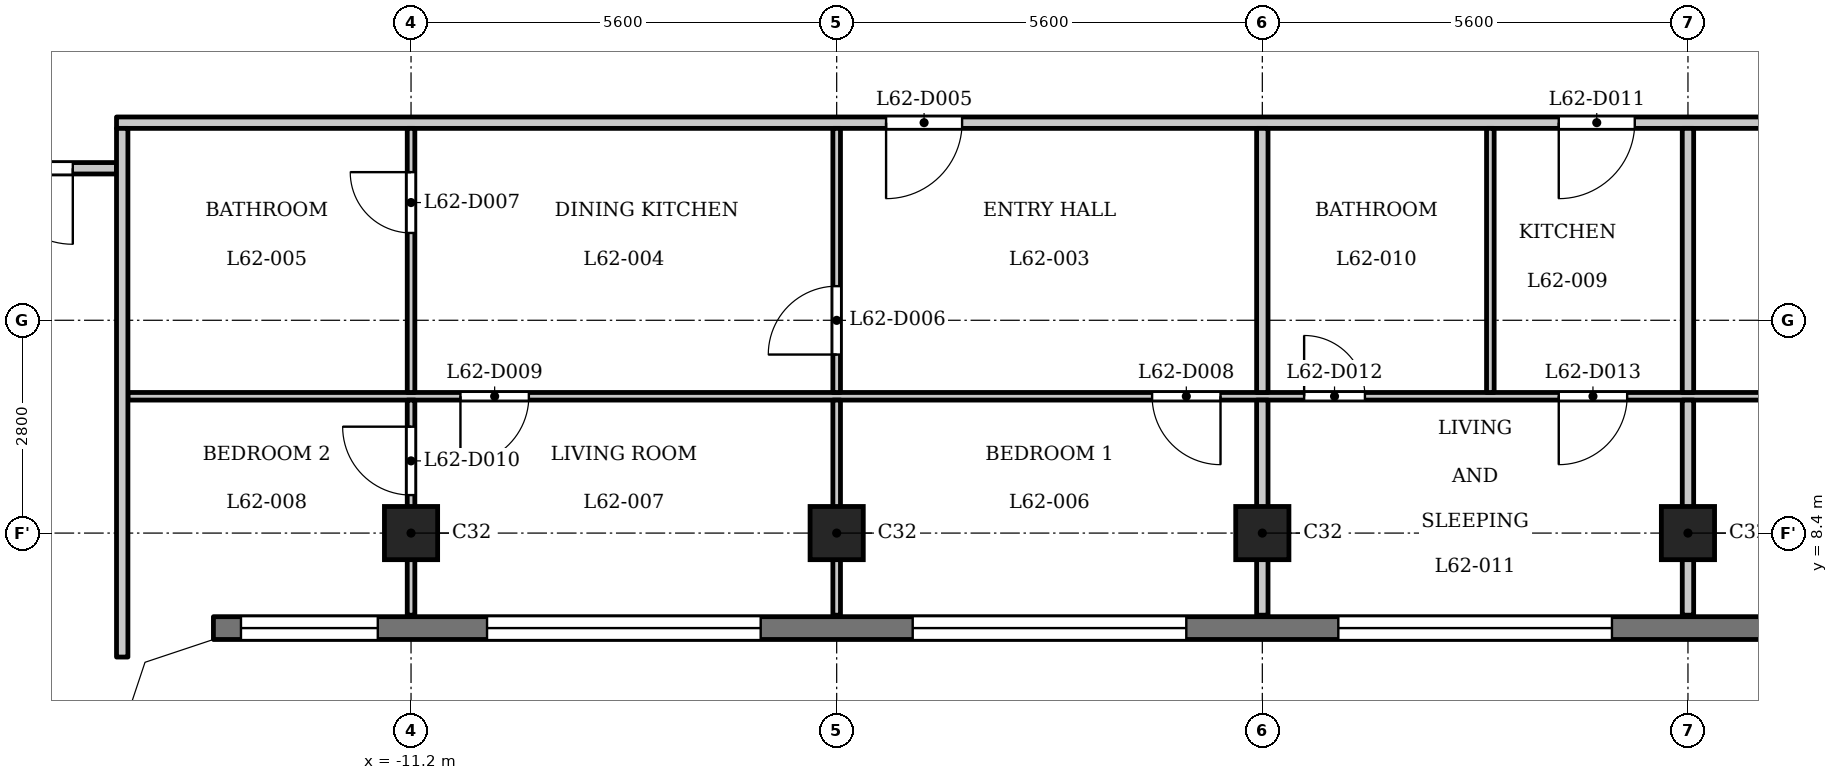
"""IFC4 building model, lengths in metres.
Left out: names, types, materials, properties, quantities, classifications, styles, units other than length and angle.
Written with IfcOpenShell. Run it as: python <this file> out.ifc"""

import sys

from ifc_helpers import new_model, si_unit, direction, frame, frame_2d, origin, origin_2d, place, context, subcontext, project, spatial, polyline, rectangle, outline, extrude, element, fill, save


model = new_model("IFC4")
c1 = context("Model", 3, precision=1e-05, world=origin(), true_north=direction((0.0, 1.0)))
c2 = subcontext(c1, "Body", "Model", "MODEL_VIEW")
j1 = project(units=[si_unit("LENGTHUNIT", "METRE"), si_unit("PLANEANGLEUNIT", "RADIAN")], contexts=[c1])
p1 = place(None, origin())
s1 = spatial("IfcSite", under=j1, at=p1, CompositionType="ELEMENT")
p2 = place(p1, origin())
s2 = spatial("IfcBuilding", under=s1, at=p2, CompositionType="ELEMENT")
p3 = place(p2, frame((0.0, 0.0, 241.7)))
s3 = spatial("IfcBuildingStorey", under=s2, at=p3, CompositionType="ELEMENT", Elevation=241.7)
for number, where, z_axis, x_axis in (
    (1, (-11.2, 8.4, 0.0), (0.0, 0.0, 1.0), (1.0, 0.0, 0.0)),
    (2, (-5.6, 8.4, 0.0), (0.0, 0.0, 1.0), (1.0, 0.0, 0.0)),
    (3, (0.0, 8.4, 0.0), (0.0, 0.0, 1.0), (1.0, 0.0, 0.0)),
    (4, (5.6, 8.4, 0.0), (0.0, 0.0, 1.0), (1.0, 0.0, 0.0)),
):
    element("IfcColumn", number, at=place(p3, frame(where, z_axis=z_axis, x_axis=x_axis)), inside=s3, PredefinedType="COLUMN", context=c2, shape_type="SweptSolid", body=[
        extrude(rectangle(XDim=0.7, YDim=0.7, at=origin_2d()), origin(), (0.0, 0.0, 1.0), 3.5),
    ])
p4 = place(p3, frame((-13.8, 7.15, 0.0), z_axis=(0.0, 0.0, 1.0), x_axis=(1.0, 0.0, 0.0)))
e5 = element("IfcWall", 5, at=p4, inside=s3, PredefinedType="SOLIDWALL", context=c2, shape_type="SweptSolid", body=[
    extrude(rectangle(XDim=27.6, YDim=0.3, at=frame_2d((13.8, 0.0))), origin(), (0.0, 0.0, 1.0), 3.2),
])
p5 = place(p4, frame((0.363, 0.0, 0.9)))
e6 = element("IfcOpeningElement", 6, at=p5, cuts=e5, PredefinedType="OPENING", context=c2, shape_type="SweptSolid", body=[
    extrude(rectangle(XDim=1.8, YDim=1.25, at=frame_2d((0.9, 0.625))), frame((0.0, 0.16, 0.0), z_axis=(0.0, -1.0, 0.0), x_axis=(1.0, 0.0, 0.0)), (0.0, 0.0, 1.0), 0.32),
])
p6 = place(p4, frame((3.6, 0.0, 1.2)))
e7 = element("IfcOpeningElement", 7, at=p6, cuts=e5, PredefinedType="OPENING", context=c2, shape_type="SweptSolid", body=[
    extrude(rectangle(XDim=3.6, YDim=0.95, at=frame_2d((1.8, 0.475))), frame((0.0, 0.16, 0.0), z_axis=(0.0, -1.0, 0.0), x_axis=(1.0, 0.0, 0.0)), (0.0, 0.0, 1.0), 0.32),
])
p7 = place(p4, frame((9.2, 0.0, 1.2)))
e8 = element("IfcOpeningElement", 8, at=p7, cuts=e5, PredefinedType="OPENING", context=c2, shape_type="SweptSolid", body=[
    extrude(rectangle(XDim=3.6, YDim=0.95, at=frame_2d((1.8, 0.475))), frame((0.0, 0.16, 0.0), z_axis=(0.0, -1.0, 0.0), x_axis=(1.0, 0.0, 0.0)), (0.0, 0.0, 1.0), 0.32),
])
p8 = place(p4, frame((14.8, 0.0, 1.2)))
e9 = element("IfcOpeningElement", 9, at=p8, cuts=e5, PredefinedType="OPENING", context=c2, shape_type="SweptSolid", body=[
    extrude(rectangle(XDim=3.6, YDim=0.95, at=frame_2d((1.8, 0.475))), frame((0.0, 0.16, 0.0), z_axis=(0.0, -1.0, 0.0), x_axis=(1.0, 0.0, 0.0)), (0.0, 0.0, 1.0), 0.32),
])
p9 = place(p4, frame((20.4, 0.0, 1.2)))
e10 = element("IfcOpeningElement", 10, at=p9, cuts=e5, PredefinedType="OPENING", context=c2, shape_type="SweptSolid", body=[
    extrude(rectangle(XDim=3.6, YDim=0.95, at=frame_2d((1.8, 0.475))), frame((0.0, 0.16, 0.0), z_axis=(0.0, -1.0, 0.0), x_axis=(1.0, 0.0, 0.0)), (0.0, 0.0, 1.0), 0.32),
])
p10 = place(p4, frame((25.438, 0.0, 0.9)))
e11 = element("IfcOpeningElement", 11, at=p10, cuts=e5, PredefinedType="OPENING", context=c2, shape_type="SweptSolid", body=[
    extrude(rectangle(XDim=1.8, YDim=1.25, at=frame_2d((0.9, 0.625))), frame((0.0, 0.16, 0.0), z_axis=(0.0, -1.0, 0.0), x_axis=(1.0, 0.0, 0.0)), (0.0, 0.0, 1.0), 0.32),
])
p11 = place(p3, frame((-14.925, 10.2, 0.0), z_axis=(0.0, 0.0, 1.0), x_axis=(1.0, 0.0, 0.0)))
e12 = element("IfcWall", 12, at=p11, inside=s3, PredefinedType="PARTITIONING", context=c2, shape_type="SweptSolid", body=[
    extrude(rectangle(XDim=29.85, YDim=0.1, at=frame_2d((14.925, 0.0))), origin(), (0.0, 0.0, 1.0), 3.2),
])
p12 = place(p11, frame((13.475, 0.0, 0.0)))
e13 = element("IfcOpeningElement", 13, at=p12, cuts=e12, PredefinedType="OPENING", context=c2, shape_type="SweptSolid", body=[
    extrude(rectangle(XDim=0.9, YDim=2.1, at=frame_2d((0.45, 1.05))), frame((0.0, 0.06, 0.0), z_axis=(0.0, -1.0, 0.0), x_axis=(1.0, 0.0, 0.0)), (0.0, 0.0, 1.0), 0.12),
])
p13 = place(p11, frame((4.375, 0.0, 0.0)))
e14 = element("IfcOpeningElement", 14, at=p13, cuts=e12, PredefinedType="OPENING", context=c2, shape_type="SweptSolid", body=[
    extrude(rectangle(XDim=0.9, YDim=2.1, at=frame_2d((0.45, 1.05))), frame((0.0, 0.06, 0.0), z_axis=(0.0, -1.0, 0.0), x_axis=(1.0, 0.0, 0.0)), (0.0, 0.0, 1.0), 0.12),
])
p14 = place(p11, frame((15.475, 0.0, 0.0)))
e15 = element("IfcOpeningElement", 15, at=p14, cuts=e12, PredefinedType="OPENING", context=c2, shape_type="SweptSolid", body=[
    extrude(rectangle(XDim=0.8, YDim=2.1, at=frame_2d((0.4, 1.05))), frame((0.0, 0.06, 0.0), z_axis=(0.0, -1.0, 0.0), x_axis=(1.0, 0.0, 0.0)), (0.0, 0.0, 1.0), 0.12),
])
p15 = place(p11, frame((18.825, 0.0, 0.0)))
e16 = element("IfcOpeningElement", 16, at=p15, cuts=e12, PredefinedType="OPENING", context=c2, shape_type="SweptSolid", body=[
    extrude(rectangle(XDim=0.9, YDim=2.1, at=frame_2d((0.45, 1.05))), frame((0.0, 0.06, 0.0), z_axis=(0.0, -1.0, 0.0), x_axis=(1.0, 0.0, 0.0)), (0.0, 0.0, 1.0), 0.12),
])
p16 = place(p11, frame((28.474, 0.0, 0.0)))
e17 = element("IfcOpeningElement", 17, at=p16, cuts=e12, PredefinedType="OPENING", context=c2, shape_type="SweptSolid", body=[
    extrude(rectangle(XDim=0.8, YDim=2.1, at=frame_2d((0.4, 1.05))), frame((0.0, 0.06, 0.0), z_axis=(0.0, -1.0, 0.0), x_axis=(1.0, 0.0, 0.0)), (0.0, 0.0, 1.0), 0.12),
])
p17 = place(p11, frame((24.675, 0.0, 0.0)))
e18 = element("IfcOpeningElement", 18, at=p17, cuts=e12, PredefinedType="OPENING", context=c2, shape_type="SweptSolid", body=[
    extrude(rectangle(XDim=0.9, YDim=2.1, at=frame_2d((0.45, 1.05))), frame((0.0, 0.06, 0.0), z_axis=(0.0, -1.0, 0.0), x_axis=(1.0, 0.0, 0.0)), (0.0, 0.0, 1.0), 0.12),
])
p18 = place(p3, frame((-17.4, 13.2, 0.0), z_axis=(0.0, 0.0, 1.0), x_axis=(1.0, 0.0, 0.0)))
e19 = element("IfcWall", 19, at=p18, inside=s3, PredefinedType="PARTITIONING", context=c2, shape_type="SweptSolid", body=[
    extrude(rectangle(XDim=2.325, YDim=0.15, at=frame_2d((1.163, 0.0))), origin(), (0.0, 0.0, 1.0), 3.2),
])
p19 = place(p18, frame((0.75, 0.0, 0.0)))
e20 = element("IfcOpeningElement", 20, at=p19, cuts=e19, PredefinedType="OPENING", context=c2, shape_type="SweptSolid", body=[
    extrude(rectangle(XDim=1.0, YDim=2.1, at=frame_2d((0.5, 1.05))), frame((0.0, 0.085, 0.0), z_axis=(0.0, -1.0, 0.0), x_axis=(1.0, 0.0, 0.0)), (0.0, 0.0, 1.0), 0.17),
])
p20 = place(p3, frame((-15.075, 13.8, 0.0), z_axis=(0.0, 0.0, 1.0), x_axis=(1.0, 0.0, 0.0)))
e21 = element("IfcWall", 21, at=p20, inside=s3, PredefinedType="PARTITIONING", context=c2, shape_type="SweptSolid", body=[
    extrude(rectangle(XDim=30.15, YDim=0.15, at=frame_2d((15.075, 0.0))), origin(), (0.0, 0.0, 1.0), 3.2),
])
p21 = place(p20, frame((10.125, 0.0, 0.0)))
e22 = element("IfcOpeningElement", 22, at=p21, cuts=e21, PredefinedType="OPENING", context=c2, shape_type="SweptSolid", body=[
    extrude(rectangle(XDim=1.0, YDim=2.1, at=frame_2d((0.5, 1.05))), frame((0.0, 0.085, 0.0), z_axis=(0.0, -1.0, 0.0), x_axis=(1.0, 0.0, 0.0)), (0.0, 0.0, 1.0), 0.17),
])
p22 = place(p20, frame((18.975, 0.0, 0.0)))
e23 = element("IfcOpeningElement", 23, at=p22, cuts=e21, PredefinedType="OPENING", context=c2, shape_type="SweptSolid", body=[
    extrude(rectangle(XDim=1.0, YDim=2.1, at=frame_2d((0.5, 1.05))), frame((0.0, 0.085, 0.0), z_axis=(0.0, -1.0, 0.0), x_axis=(1.0, 0.0, 0.0)), (0.0, 0.0, 1.0), 0.17),
])
p23 = place(p20, frame((24.575, 0.0, 0.0)))
e24 = element("IfcOpeningElement", 24, at=p23, cuts=e21, PredefinedType="OPENING", context=c2, shape_type="SweptSolid", body=[
    extrude(rectangle(XDim=1.0, YDim=2.1, at=frame_2d((0.5, 1.05))), frame((0.0, 0.085, 0.0), z_axis=(0.0, -1.0, 0.0), x_axis=(1.0, 0.0, 0.0)), (0.0, 0.0, 1.0), 0.17),
])
p24 = place(p3, frame((-15.0, 6.769, 0.0), z_axis=(0.0, 0.0, 1.0), x_axis=(0.0, 1.0, 0.0)))
e25 = element("IfcWall", 25, at=p24, inside=s3, PredefinedType="PARTITIONING", context=c2, shape_type="SweptSolid", body=[
    extrude(rectangle(XDim=6.956, YDim=0.15, at=frame_2d((3.478, 0.0))), origin(), (0.0, 0.0, 1.0), 3.2),
])
p25 = place(p3, frame((-11.2, 7.32, 0.0), z_axis=(0.0, 0.0, 1.0), x_axis=(0.0, 1.0, 0.0)))
e26 = element("IfcWall", 26, at=p25, inside=s3, PredefinedType="PARTITIONING", context=c2, shape_type="SweptSolid", body=[
    extrude(rectangle(XDim=2.83, YDim=0.1, at=frame_2d((1.415, 0.0))), origin(), (0.0, 0.0, 1.0), 3.2),
])
p26 = place(p25, frame((1.58, 0.0, 0.0)))
e27 = element("IfcOpeningElement", 27, at=p26, cuts=e26, PredefinedType="OPENING", context=c2, shape_type="SweptSolid", body=[
    extrude(rectangle(XDim=0.9, YDim=2.1, at=frame_2d((0.45, 1.05))), frame((0.0, 0.06, 0.0), z_axis=(0.0, -1.0, 0.0), x_axis=(1.0, 0.0, 0.0)), (0.0, 0.0, 1.0), 0.12),
])
p27 = place(p3, frame((-11.2, 10.25, 0.0), z_axis=(0.0, 0.0, 1.0), x_axis=(0.0, 1.0, 0.0)))
e28 = element("IfcWall", 28, at=p27, inside=s3, PredefinedType="PARTITIONING", context=c2, shape_type="SweptSolid", body=[
    extrude(rectangle(XDim=3.475, YDim=0.1, at=frame_2d((1.738, 0.0))), origin(), (0.0, 0.0, 1.0), 3.2),
])
p28 = place(p27, frame((2.099, 0.0, 0.0)))
e29 = element("IfcOpeningElement", 29, at=p28, cuts=e28, PredefinedType="OPENING", context=c2, shape_type="SweptSolid", body=[
    extrude(rectangle(XDim=0.8, YDim=2.1, at=frame_2d((0.4, 1.05))), frame((0.0, 0.06, 0.0), z_axis=(0.0, -1.0, 0.0), x_axis=(1.0, 0.0, 0.0)), (0.0, 0.0, 1.0), 0.12),
])
p29 = place(p3, frame((-5.6, 7.32, 0.0), z_axis=(0.0, 0.0, 1.0), x_axis=(0.0, 1.0, 0.0)))
e30 = element("IfcWall", 30, at=p29, inside=s3, PredefinedType="PARTITIONING", context=c2, shape_type="SweptSolid", body=[
    extrude(rectangle(XDim=2.83, YDim=0.1, at=frame_2d((1.415, 0.0))), origin(), (0.0, 0.0, 1.0), 3.2),
])
p30 = place(p3, frame((-5.6, 10.25, 0.0), z_axis=(0.0, 0.0, 1.0), x_axis=(0.0, 1.0, 0.0)))
e31 = element("IfcWall", 31, at=p30, inside=s3, PredefinedType="PARTITIONING", context=c2, shape_type="SweptSolid", body=[
    extrude(rectangle(XDim=3.475, YDim=0.1, at=frame_2d((1.738, 0.0))), origin(), (0.0, 0.0, 1.0), 3.2),
])
p31 = place(p30, frame((0.499, 0.0, 0.0)))
e32 = element("IfcOpeningElement", 32, at=p31, cuts=e31, PredefinedType="OPENING", context=c2, shape_type="SweptSolid", body=[
    extrude(rectangle(XDim=0.9, YDim=2.1, at=frame_2d((0.45, 1.05))), frame((0.0, 0.06, 0.0), z_axis=(0.0, -1.0, 0.0), x_axis=(1.0, 0.0, 0.0)), (0.0, 0.0, 1.0), 0.12),
])
p32 = place(p3, frame((0.0, 7.32, 0.0), z_axis=(0.0, 0.0, 1.0), x_axis=(0.0, 1.0, 0.0)))
e33 = element("IfcWall", 33, at=p32, inside=s3, PredefinedType="PARTITIONING", context=c2, shape_type="SweptSolid", body=[
    extrude(rectangle(XDim=2.83, YDim=0.15, at=frame_2d((1.415, 0.0))), origin(), (0.0, 0.0, 1.0), 3.2),
])
p33 = place(p3, frame((0.0, 10.25, 0.0), z_axis=(0.0, 0.0, 1.0), x_axis=(0.0, 1.0, 0.0)))
e34 = element("IfcWall", 34, at=p33, inside=s3, PredefinedType="PARTITIONING", context=c2, shape_type="SweptSolid", body=[
    extrude(rectangle(XDim=3.475, YDim=0.15, at=frame_2d((1.738, 0.0))), origin(), (0.0, 0.0, 1.0), 3.2),
])
p34 = place(p3, frame((3.0, 10.25, 0.0), z_axis=(0.0, 0.0, 1.0), x_axis=(0.0, 1.0, 0.0)))
e35 = element("IfcWall", 35, at=p34, inside=s3, PredefinedType="PARTITIONING", context=c2, shape_type="SweptSolid", body=[
    extrude(rectangle(XDim=3.475, YDim=0.1, at=frame_2d((1.738, 0.0))), origin(), (0.0, 0.0, 1.0), 3.2),
])
p35 = place(p3, frame((5.6, 7.32, 0.0), z_axis=(0.0, 0.0, 1.0), x_axis=(0.0, 1.0, 0.0)))
e36 = element("IfcWall", 36, at=p35, inside=s3, PredefinedType="PARTITIONING", context=c2, shape_type="SweptSolid", body=[
    extrude(rectangle(XDim=2.83, YDim=0.15, at=frame_2d((1.415, 0.0))), origin(), (0.0, 0.0, 1.0), 3.2),
])
p36 = place(p3, frame((5.6, 10.25, 0.0), z_axis=(0.0, 0.0, 1.0), x_axis=(0.0, 1.0, 0.0)))
e37 = element("IfcWall", 37, at=p36, inside=s3, PredefinedType="PARTITIONING", context=c2, shape_type="SweptSolid", body=[
    extrude(rectangle(XDim=3.475, YDim=0.15, at=frame_2d((1.738, 0.0))), origin(), (0.0, 0.0, 1.0), 3.2),
])
p37 = place(p3, origin())
e38 = element("IfcWall", 38, at=p37, inside=s3, PredefinedType="SOLIDWALL", context=c2, shape_type="SweptSolid", body=[
    extrude(outline(polyline([(-13.849, 7.3), (-14.937, 6.937), (-15.3, 5.849), (-15.3, 5.8), (-15.0, 5.8), (-14.7, 6.7), (-13.8, 7.0), (-13.8, 7.3), (-13.849, 7.3)])), origin(), (0.0, 0.0, 1.0), 3.2),
])
p38 = place(p19, origin())
e39 = element("IfcDoor", 39, at=p38, inside=s3, OperationType="SINGLE_SWING_RIGHT", PredefinedType="DOOR", context=c2, shape_type="SweptSolid", body=[
    extrude(rectangle(XDim=1.0, YDim=2.1, at=frame_2d((0.5, 1.05))), frame((0.0, 0.025, 0.0), z_axis=(0.0, -1.0, 0.0), x_axis=(1.0, 0.0, 0.0)), (0.0, 0.0, 1.0), 0.05),
])
fill(e20, e39)
p39 = place(p21, origin())
e40 = element("IfcDoor", 40, at=p39, inside=s3, OperationType="SINGLE_SWING_LEFT", PredefinedType="DOOR", context=c2, shape_type="SweptSolid", body=[
    extrude(rectangle(XDim=1.0, YDim=2.1, at=frame_2d((0.5, 1.05))), frame((0.0, 0.025, 0.0), z_axis=(0.0, -1.0, 0.0), x_axis=(1.0, 0.0, 0.0)), (0.0, 0.0, 1.0), 0.05),
])
fill(e22, e40)
p40 = place(p31, origin())
e41 = element("IfcDoor", 41, at=p40, inside=s3, OperationType="SINGLE_SWING_RIGHT", PredefinedType="DOOR", context=c2, shape_type="SweptSolid", body=[
    extrude(rectangle(XDim=0.9, YDim=2.1, at=frame_2d((0.45, 1.05))), frame((0.0, 0.025, 0.0), z_axis=(0.0, -1.0, 0.0), x_axis=(1.0, 0.0, 0.0)), (0.0, 0.0, 1.0), 0.05),
])
fill(e32, e41)
p41 = place(p28, origin())
e42 = element("IfcDoor", 42, at=p41, inside=s3, OperationType="SINGLE_SWING_LEFT", PredefinedType="DOOR", context=c2, shape_type="SweptSolid", body=[
    extrude(rectangle(XDim=0.8, YDim=2.1, at=frame_2d((0.4, 1.05))), frame((0.0, 0.025, 0.0), z_axis=(0.0, -1.0, 0.0), x_axis=(1.0, 0.0, 0.0)), (0.0, 0.0, 1.0), 0.05),
])
fill(e29, e42)
p42 = place(p12, origin())
e43 = element("IfcDoor", 43, at=p42, inside=s3, OperationType="SINGLE_SWING_RIGHT", PredefinedType="DOOR", context=c2, shape_type="SweptSolid", body=[
    extrude(rectangle(XDim=0.9, YDim=2.1, at=frame_2d((0.45, 1.05))), frame((0.0, 0.025, 0.0), z_axis=(0.0, -1.0, 0.0), x_axis=(1.0, 0.0, 0.0)), (0.0, 0.0, 1.0), 0.05),
])
fill(e13, e43)
p43 = place(p13, origin())
e44 = element("IfcDoor", 44, at=p43, inside=s3, OperationType="SINGLE_SWING_LEFT", PredefinedType="DOOR", context=c2, shape_type="SweptSolid", body=[
    extrude(rectangle(XDim=0.9, YDim=2.1, at=frame_2d((0.45, 1.05))), frame((0.0, 0.025, 0.0), z_axis=(0.0, -1.0, 0.0), x_axis=(1.0, 0.0, 0.0)), (0.0, 0.0, 1.0), 0.05),
])
fill(e14, e44)
p44 = place(p26, origin())
e45 = element("IfcDoor", 45, at=p44, inside=s3, OperationType="SINGLE_SWING_LEFT", PredefinedType="DOOR", context=c2, shape_type="SweptSolid", body=[
    extrude(rectangle(XDim=0.9, YDim=2.1, at=frame_2d((0.45, 1.05))), frame((0.0, 0.025, 0.0), z_axis=(0.0, -1.0, 0.0), x_axis=(1.0, 0.0, 0.0)), (0.0, 0.0, 1.0), 0.05),
])
fill(e27, e45)
p45 = place(p22, origin())
e46 = element("IfcDoor", 46, at=p45, inside=s3, OperationType="SINGLE_SWING_LEFT", PredefinedType="DOOR", context=c2, shape_type="SweptSolid", body=[
    extrude(rectangle(XDim=1.0, YDim=2.1, at=frame_2d((0.5, 1.05))), frame((0.0, 0.025, 0.0), z_axis=(0.0, -1.0, 0.0), x_axis=(1.0, 0.0, 0.0)), (0.0, 0.0, 1.0), 0.05),
])
fill(e23, e46)
p46 = place(p14, origin())
e47 = element("IfcDoor", 47, at=p46, inside=s3, OperationType="SINGLE_SWING_RIGHT", PredefinedType="DOOR", context=c2, shape_type="SweptSolid", body=[
    extrude(rectangle(XDim=0.8, YDim=2.1, at=frame_2d((0.4, 1.05))), frame((0.0, 0.025, 0.0), z_axis=(0.0, -1.0, 0.0), x_axis=(1.0, 0.0, 0.0)), (0.0, 0.0, 1.0), 0.05),
])
fill(e15, e47)
p47 = place(p15, origin())
e48 = element("IfcDoor", 48, at=p47, inside=s3, OperationType="SINGLE_SWING_LEFT", PredefinedType="DOOR", context=c2, shape_type="SweptSolid", body=[
    extrude(rectangle(XDim=0.9, YDim=2.1, at=frame_2d((0.45, 1.05))), frame((0.0, 0.025, 0.0), z_axis=(0.0, -1.0, 0.0), x_axis=(1.0, 0.0, 0.0)), (0.0, 0.0, 1.0), 0.05),
])
fill(e16, e48)
p48 = place(p5, origin())
e49 = element("IfcWindow", 49, at=p48, inside=s3, PartitioningType="SINGLE_PANEL", PredefinedType="WINDOW", context=c2, shape_type="SweptSolid", body=[
    extrude(rectangle(XDim=1.8, YDim=1.25, at=frame_2d((0.9, 0.625))), frame((0.0, 0.03, 0.0), z_axis=(0.0, -1.0, 0.0), x_axis=(1.0, 0.0, 0.0)), (0.0, 0.0, 1.0), 0.06),
])
fill(e6, e49)
p49 = place(p6, origin())
e50 = element("IfcWindow", 50, at=p49, inside=s3, PartitioningType="SINGLE_PANEL", PredefinedType="WINDOW", context=c2, shape_type="SweptSolid", body=[
    extrude(rectangle(XDim=3.6, YDim=0.95, at=frame_2d((1.8, 0.475))), frame((0.0, 0.03, 0.0), z_axis=(0.0, -1.0, 0.0), x_axis=(1.0, 0.0, 0.0)), (0.0, 0.0, 1.0), 0.06),
])
fill(e7, e50)
p50 = place(p7, origin())
e51 = element("IfcWindow", 51, at=p50, inside=s3, PartitioningType="SINGLE_PANEL", PredefinedType="WINDOW", context=c2, shape_type="SweptSolid", body=[
    extrude(rectangle(XDim=3.6, YDim=0.95, at=frame_2d((1.8, 0.475))), frame((0.0, 0.03, 0.0), z_axis=(0.0, -1.0, 0.0), x_axis=(1.0, 0.0, 0.0)), (0.0, 0.0, 1.0), 0.06),
])
fill(e8, e51)
p51 = place(p8, origin())
e52 = element("IfcWindow", 52, at=p51, inside=s3, PartitioningType="SINGLE_PANEL", PredefinedType="WINDOW", context=c2, shape_type="SweptSolid", body=[
    extrude(rectangle(XDim=3.6, YDim=0.95, at=frame_2d((1.8, 0.475))), frame((0.0, 0.03, 0.0), z_axis=(0.0, -1.0, 0.0), x_axis=(1.0, 0.0, 0.0)), (0.0, 0.0, 1.0), 0.06),
])
fill(e9, e52)
save(model, sys.argv[1])
